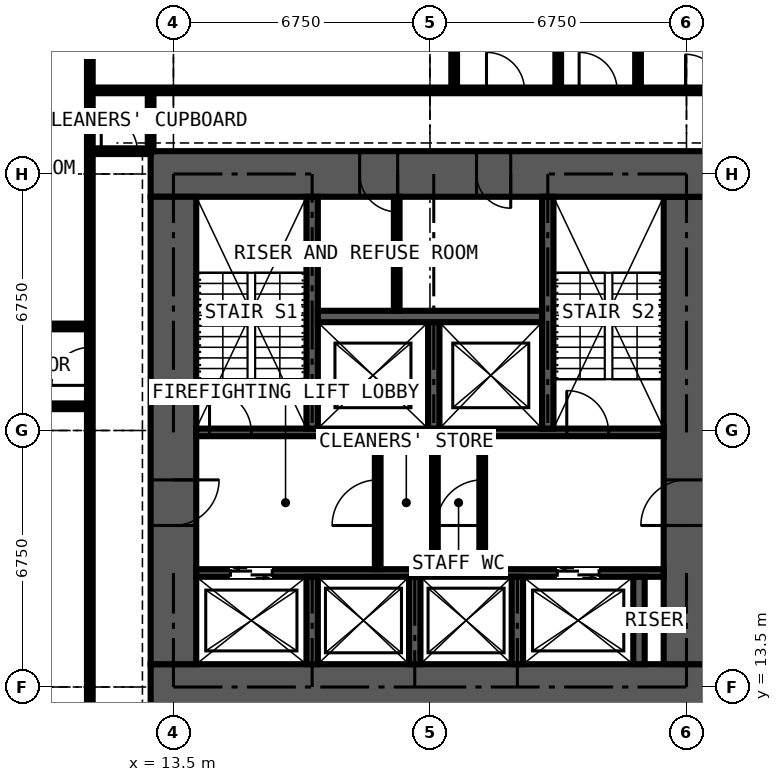
"""IFC4 building model, lengths in metres.
Left out: names, types, materials, properties, quantities, classifications, styles, units other than length and angle.
Written with IfcOpenShell. Run it as: python <this file> out.ifc"""

import sys

from ifc_helpers import new_model, si_unit, direction, frame, frame_2d, origin, place, context, subcontext, project, spatial, rectangle, extrude, element, fill, save


model = new_model("IFC4")
c1 = context("Model", 3, precision=1e-05, world=origin(), true_north=direction((0.0, 1.0)))
c2 = subcontext(c1, "Body", "Model", "MODEL_VIEW")
j1 = project(units=[si_unit("LENGTHUNIT", "METRE"), si_unit("PLANEANGLEUNIT", "RADIAN")], contexts=[c1])
p1 = place(None, origin())
s1 = spatial("IfcSite", under=j1, at=p1, CompositionType="ELEMENT")
p2 = place(p1, origin())
s2 = spatial("IfcBuilding", under=s1, at=p2, CompositionType="ELEMENT")
p3 = place(p2, frame((0.0, 0.0, 25.2)))
s3 = spatial("IfcBuildingStorey", under=s2, at=p3, CompositionType="ELEMENT", Elevation=25.2)
p4 = place(p3, frame((12.9, 13.5, 0.0), z_axis=(0.0, 0.0, 1.0), x_axis=(1.0, 0.0, 0.0)))
e1 = element("IfcWall", 1, at=p4, inside=s3, PredefinedType="SHEAR", context=c2, shape_type="SweptSolid", body=[
    extrude(rectangle(XDim=14.7, YDim=1.2, at=frame_2d((7.35, 0.0))), origin(), (0.0, 0.0, 1.0), 3.6),
])
p5 = place(p3, frame((27.0, 14.1, 0.0), z_axis=(0.0, 0.0, 1.0), x_axis=(0.0, 1.0, 0.0)))
e2 = element("IfcWall", 2, at=p5, inside=s3, PredefinedType="SHEAR", context=c2, shape_type="SweptSolid", body=[
    extrude(rectangle(XDim=12.3, YDim=1.2, at=frame_2d((6.15, 0.0))), origin(), (0.0, 0.0, 1.0), 3.6),
])
p6 = place(p5, frame((3.65, 0.0, 0.0)))
e3 = element("IfcOpeningElement", 3, at=p6, cuts=e2, PredefinedType="OPENING", context=c2, shape_type="SweptSolid", body=[
    extrude(rectangle(XDim=1.2, YDim=2.2, at=frame_2d((0.6, 1.1))), frame((0.0, 0.61, 0.0), z_axis=(0.0, -1.0, 0.0), x_axis=(1.0, 0.0, 0.0)), (0.0, 0.0, 1.0), 1.22),
])
p7 = place(p3, frame((27.6, 27.0, 0.0), z_axis=(0.0, 0.0, 1.0), x_axis=(-1.0, 0.0, 0.0)))
e4 = element("IfcWall", 4, at=p7, inside=s3, PredefinedType="SHEAR", context=c2, shape_type="SweptSolid", body=[
    extrude(rectangle(XDim=14.7, YDim=1.2, at=frame_2d((7.35, 0.0))), origin(), (0.0, 0.0, 1.0), 3.6),
])
p8 = place(p7, frame((5.225, 0.0, 0.0)))
e5 = element("IfcOpeningElement", 5, at=p8, cuts=e4, PredefinedType="OPENING", context=c2, shape_type="SweptSolid", body=[
    extrude(rectangle(XDim=0.9, YDim=2.2, at=frame_2d((0.45, 1.1))), frame((0.0, 0.61, 0.0), z_axis=(0.0, -1.0, 0.0), x_axis=(1.0, 0.0, 0.0)), (0.0, 0.0, 1.0), 1.22),
])
p9 = place(p7, frame((8.2, 0.0, 0.0)))
e6 = element("IfcOpeningElement", 6, at=p9, cuts=e4, PredefinedType="OPENING", context=c2, shape_type="SweptSolid", body=[
    extrude(rectangle(XDim=1.0, YDim=2.2, at=frame_2d((0.5, 1.1))), frame((0.0, 0.61, 0.0), z_axis=(0.0, -1.0, 0.0), x_axis=(1.0, 0.0, 0.0)), (0.0, 0.0, 1.0), 1.22),
])
p10 = place(p3, frame((13.5, 26.4, 0.0), z_axis=(0.0, 0.0, 1.0), x_axis=(0.0, -1.0, 0.0)))
e7 = element("IfcWall", 7, at=p10, inside=s3, PredefinedType="SHEAR", context=c2, shape_type="SweptSolid", body=[
    extrude(rectangle(XDim=12.3, YDim=1.2, at=frame_2d((6.15, 0.0))), origin(), (0.0, 0.0, 1.0), 3.6),
])
p11 = place(p10, frame((7.45, 0.0, 0.0)))
e8 = element("IfcOpeningElement", 8, at=p11, cuts=e7, PredefinedType="OPENING", context=c2, shape_type="SweptSolid", body=[
    extrude(rectangle(XDim=1.2, YDim=2.2, at=frame_2d((0.6, 1.1))), frame((0.0, 0.61, 0.0), z_axis=(0.0, -1.0, 0.0), x_axis=(1.0, 0.0, 0.0)), (0.0, 0.0, 1.0), 1.22),
])
p12 = place(p3, frame((14.1, 16.5, 0.0), z_axis=(0.0, 0.0, 1.0), x_axis=(1.0, 0.0, 0.0)))
e9 = element("IfcWall", 9, at=p12, inside=s3, PredefinedType="SHEAR", context=c2, shape_type="SweptSolid", body=[
    extrude(rectangle(XDim=12.3, YDim=0.2, at=frame_2d((6.15, 0.0))), origin(), (0.0, 0.0, 1.0), 3.6),
])
p13 = place(p12, frame((0.9, 0.0, 0.0)))
e10 = element("IfcOpeningElement", 10, at=p13, cuts=e9, PredefinedType="OPENING", context=c2, shape_type="SweptSolid", body=[
    extrude(rectangle(XDim=1.1, YDim=2.2, at=frame_2d((0.55, 1.1))), frame((0.0, 0.11, 0.0), z_axis=(0.0, -1.0, 0.0), x_axis=(1.0, 0.0, 0.0)), (0.0, 0.0, 1.0), 0.22),
])
p14 = place(p12, frame((9.5, 0.0, 0.0)))
e11 = element("IfcOpeningElement", 11, at=p14, cuts=e9, PredefinedType="OPENING", context=c2, shape_type="SweptSolid", body=[
    extrude(rectangle(XDim=1.1, YDim=2.2, at=frame_2d((0.55, 1.1))), frame((0.0, 0.11, 0.0), z_axis=(0.0, -1.0, 0.0), x_axis=(1.0, 0.0, 0.0)), (0.0, 0.0, 1.0), 0.22),
])
p15 = place(p3, frame((14.1, 20.2, 0.0), z_axis=(0.0, 0.0, 1.0), x_axis=(1.0, 0.0, 0.0)))
e12 = element("IfcWall", 12, at=p15, inside=s3, PredefinedType="SHEAR", context=c2, shape_type="SweptSolid", body=[
    extrude(rectangle(XDim=12.3, YDim=0.2, at=frame_2d((6.15, 0.0))), origin(), (0.0, 0.0, 1.0), 3.6),
])
p16 = place(p15, frame((0.35, 0.0, 0.0)))
e13 = element("IfcOpeningElement", 13, at=p16, cuts=e12, PredefinedType="OPENING", context=c2, shape_type="SweptSolid", body=[
    extrude(rectangle(XDim=1.1, YDim=2.2, at=frame_2d((0.55, 1.1))), frame((0.0, 0.11, 0.0), z_axis=(0.0, -1.0, 0.0), x_axis=(1.0, 0.0, 0.0)), (0.0, 0.0, 1.0), 0.22),
])
p17 = place(p15, frame((9.75, 0.0, 0.0)))
e14 = element("IfcOpeningElement", 14, at=p17, cuts=e12, PredefinedType="OPENING", context=c2, shape_type="SweptSolid", body=[
    extrude(rectangle(XDim=1.1, YDim=2.2, at=frame_2d((0.55, 1.1))), frame((0.0, 0.11, 0.0), z_axis=(0.0, -1.0, 0.0), x_axis=(1.0, 0.0, 0.0)), (0.0, 0.0, 1.0), 0.22),
])
for number, where, z_axis, x_axis in (
    (15, (17.15, 20.3, 0.0), (0.0, 0.0, 1.0), (0.0, 1.0, 0.0)),
    (16, (23.35, 20.3, 0.0), (0.0, 0.0, 1.0), (0.0, 1.0, 0.0)),
):
    element("IfcWall", number, at=place(p3, frame(where, z_axis=z_axis, x_axis=x_axis)), inside=s3, PredefinedType="SHEAR", context=c2, shape_type="SweptSolid", body=[
        extrude(rectangle(XDim=6.1, YDim=0.3, at=frame_2d((3.05, 0.0))), origin(), (0.0, 0.0, 1.0), 3.6),
    ])
p18 = place(p3, frame((20.35, 20.3, 0.0), z_axis=(0.0, 0.0, 1.0), x_axis=(0.0, 1.0, 0.0)))
e17 = element("IfcWall", 17, at=p18, inside=s3, PredefinedType="SHEAR", context=c2, shape_type="SweptSolid", body=[
    extrude(rectangle(XDim=2.8, YDim=0.3, at=frame_2d((1.4, 0.0))), origin(), (0.0, 0.0, 1.0), 3.6),
])
p19 = place(p3, frame((17.3, 23.25, 0.0), z_axis=(0.0, 0.0, 1.0), x_axis=(1.0, 0.0, 0.0)))
e18 = element("IfcWall", 18, at=p19, inside=s3, PredefinedType="SHEAR", context=c2, shape_type="SweptSolid", body=[
    extrude(rectangle(XDim=5.9, YDim=0.3, at=frame_2d((2.95, 0.0))), origin(), (0.0, 0.0, 1.0), 3.6),
])
for number, where, z_axis, x_axis in (
    (19, (17.15, 14.1, 0.0), (0.0, 0.0, 1.0), (0.0, 1.0, 0.0)),
    (20, (19.85, 14.1, 0.0), (0.0, 0.0, 1.0), (0.0, 1.0, 0.0)),
    (21, (22.55, 14.1, 0.0), (0.0, 0.0, 1.0), (0.0, 1.0, 0.0)),
    (22, (25.75, 14.1, 0.0), (0.0, 0.0, 1.0), (0.0, 1.0, 0.0)),
):
    element("IfcWall", number, at=place(p3, frame(where, z_axis=z_axis, x_axis=x_axis)), inside=s3, PredefinedType="SHEAR", context=c2, shape_type="SweptSolid", body=[
        extrude(rectangle(XDim=2.3, YDim=0.3, at=frame_2d((1.15, 0.0))), origin(), (0.0, 0.0, 1.0), 3.6),
    ])
p20 = place(p3, frame((18.875, 16.6, 0.0), z_axis=(0.0, 0.0, 1.0), x_axis=(0.0, 1.0, 0.0)))
e23 = element("IfcWall", 23, at=p20, inside=s3, PredefinedType="PARTITIONING", context=c2, shape_type="SweptSolid", body=[
    extrude(rectangle(XDim=3.5, YDim=0.15, at=frame_2d((1.75, 0.0))), origin(), (0.0, 0.0, 1.0), 3.375),
])
p21 = place(p20, frame((1.15, 0.0, 0.0)))
e24 = element("IfcOpeningElement", 24, at=p21, cuts=e23, PredefinedType="OPENING", context=c2, shape_type="SweptSolid", body=[
    extrude(rectangle(XDim=1.2, YDim=2.2, at=frame_2d((0.6, 1.1))), frame((0.0, 0.085, 0.0), z_axis=(0.0, -1.0, 0.0), x_axis=(1.0, 0.0, 0.0)), (0.0, 0.0, 1.0), 0.17),
])
p22 = place(p3, frame((21.625, 16.6, 0.0), z_axis=(0.0, 0.0, 1.0), x_axis=(0.0, 1.0, 0.0)))
e25 = element("IfcWall", 25, at=p22, inside=s3, PredefinedType="PARTITIONING", context=c2, shape_type="SweptSolid", body=[
    extrude(rectangle(XDim=3.5, YDim=0.15, at=frame_2d((1.75, 0.0))), origin(), (0.0, 0.0, 1.0), 3.375),
])
p23 = place(p22, frame((1.15, 0.0, 0.0)))
e26 = element("IfcOpeningElement", 26, at=p23, cuts=e25, PredefinedType="OPENING", context=c2, shape_type="SweptSolid", body=[
    extrude(rectangle(XDim=1.2, YDim=2.2, at=frame_2d((0.6, 1.1))), frame((0.0, 0.085, 0.0), z_axis=(0.0, -1.0, 0.0), x_axis=(1.0, 0.0, 0.0)), (0.0, 0.0, 1.0), 0.17),
])
p24 = place(p3, frame((20.38, 16.6, 0.0), z_axis=(0.0, 0.0, 1.0), x_axis=(0.0, 1.0, 0.0)))
e27 = element("IfcWall", 27, at=p24, inside=s3, PredefinedType="PARTITIONING", context=c2, shape_type="SweptSolid", body=[
    extrude(rectangle(XDim=3.5, YDim=0.15, at=frame_2d((1.75, 0.0))), origin(), (0.0, 0.0, 1.0), 3.375),
])
p25 = place(p3, frame((19.375, 23.4, 0.0), z_axis=(0.0, 0.0, 1.0), x_axis=(0.0, 1.0, 0.0)))
e28 = element("IfcWall", 28, at=p25, inside=s3, PredefinedType="PARTITIONING", context=c2, shape_type="SweptSolid", body=[
    extrude(rectangle(XDim=3.0, YDim=0.15, at=frame_2d((1.5, 0.0))), origin(), (0.0, 0.0, 1.0), 3.375),
])
for number, where, z_axis, x_axis in (
    (29, (5.65, 20.887, 0.0), (0.0, 0.0, 1.0), (1.0, 0.0, 0.0)),
    (30, (5.65, 22.988, 0.0), (0.0, 0.0, 1.0), (1.0, 0.0, 0.0)),
):
    element("IfcWall", number, at=place(p3, frame(where, z_axis=z_axis, x_axis=x_axis)), inside=s3, PredefinedType="PARTITIONING", context=c2, shape_type="SweptSolid", body=[
        extrude(rectangle(XDim=5.65, YDim=0.15, at=frame_2d((2.825, 0.0))), origin(), (0.0, 0.0, 1.0), 3.375),
    ])
p26 = place(p3, frame((11.3, 11.3, 0.0), z_axis=(0.0, 0.0, 1.0), x_axis=(0.0, 1.0, 0.0)))
e31 = element("IfcWall", 31, at=p26, inside=s3, PredefinedType="PARTITIONING", context=c2, shape_type="SweptSolid", body=[
    extrude(rectangle(XDim=19.075, YDim=0.15, at=frame_2d((9.538, 0.0))), origin(), (0.0, 0.0, 1.0), 3.375),
])
p27 = place(p26, frame((10.137, 0.0, 0.0)))
e32 = element("IfcOpeningElement", 32, at=p27, cuts=e31, PredefinedType="OPENING", context=c2, shape_type="SweptSolid", body=[
    extrude(rectangle(XDim=1.0, YDim=2.2, at=frame_2d((0.5, 1.1))), frame((0.0, 0.085, 0.0), z_axis=(0.0, -1.0, 0.0), x_axis=(1.0, 0.0, 0.0)), (0.0, 0.0, 1.0), 0.17),
])
p28 = place(p3, frame((11.3, 27.6, 0.0), z_axis=(0.0, 0.0, 1.0), x_axis=(1.0, 0.0, 0.0)))
e33 = element("IfcWall", 33, at=p28, inside=s3, PredefinedType="PARTITIONING", context=c2, shape_type="SweptSolid", body=[
    extrude(rectangle(XDim=1.6, YDim=0.15, at=frame_2d((0.8, 0.0))), origin(), (0.0, 0.0, 1.0), 2.877),
])
p29 = place(p28, frame((0.3, 0.0, 0.0)))
e34 = element("IfcOpeningElement", 34, at=p29, cuts=e33, PredefinedType="OPENING", context=c2, shape_type="SweptSolid", body=[
    extrude(rectangle(XDim=0.95, YDim=2.2, at=frame_2d((0.475, 1.1))), frame((0.0, 0.085, 0.0), z_axis=(0.0, -1.0, 0.0), x_axis=(1.0, 0.0, 0.0)), (0.0, 0.0, 1.0), 0.17),
])
p30 = place(p3, frame((11.3, 29.2, 0.0), z_axis=(0.0, 0.0, 1.0), x_axis=(1.0, 0.0, 0.0)))
e35 = element("IfcWall", 35, at=p30, inside=s3, PredefinedType="PARTITIONING", context=c2, shape_type="SweptSolid", body=[
    extrude(rectangle(XDim=19.075, YDim=0.15, at=frame_2d((9.538, 0.0))), origin(), (0.0, 0.0, 1.0), 3.375),
])
p31 = place(p30, frame((12.875, 0.0, 0.0)))
e36 = element("IfcOpeningElement", 36, at=p31, cuts=e35, PredefinedType="OPENING", context=c2, shape_type="SweptSolid", body=[
    extrude(rectangle(XDim=1.0, YDim=2.2, at=frame_2d((0.5, 1.1))), frame((0.0, 0.085, 0.0), z_axis=(0.0, -1.0, 0.0), x_axis=(1.0, 0.0, 0.0)), (0.0, 0.0, 1.0), 0.17),
])
p32 = place(p30, frame((10.438, 0.0, 0.0)))
e37 = element("IfcOpeningElement", 37, at=p32, cuts=e35, PredefinedType="OPENING", context=c2, shape_type="SweptSolid", body=[
    extrude(rectangle(XDim=1.0, YDim=2.2, at=frame_2d((0.5, 1.1))), frame((0.0, 0.085, 0.0), z_axis=(0.0, -1.0, 0.0), x_axis=(1.0, 0.0, 0.0)), (0.0, 0.0, 1.0), 0.17),
])
p33 = place(p30, frame((15.675, 0.0, 0.0)))
e38 = element("IfcOpeningElement", 38, at=p33, cuts=e35, PredefinedType="OPENING", context=c2, shape_type="SweptSolid", body=[
    extrude(rectangle(XDim=0.95, YDim=2.2, at=frame_2d((0.475, 1.1))), frame((0.0, 0.085, 0.0), z_axis=(0.0, -1.0, 0.0), x_axis=(1.0, 0.0, 0.0)), (0.0, 0.0, 1.0), 0.17),
])
p34 = place(p3, frame((12.9, 27.6, 0.0), z_axis=(0.0, 0.0, 1.0), x_axis=(0.0, 1.0, 0.0)))
e39 = element("IfcWall", 39, at=p34, inside=s3, PredefinedType="PARTITIONING", context=c2, shape_type="SweptSolid", body=[
    extrude(rectangle(XDim=1.6, YDim=0.15, at=frame_2d((0.8, 0.0))), origin(), (0.0, 0.0, 1.0), 3.375),
])
p35 = place(p3, frame((20.887, 29.2, 0.0), z_axis=(0.0, 0.0, 1.0), x_axis=(0.0, 1.0, 0.0)))
e40 = element("IfcWall", 40, at=p35, inside=s3, PredefinedType="PARTITIONING", context=c2, shape_type="SweptSolid", body=[
    extrude(rectangle(XDim=5.65, YDim=0.15, at=frame_2d((2.825, 0.0))), origin(), (0.0, 0.0, 1.0), 3.375),
])
p36 = place(p3, frame((23.625, 29.2, 0.0), z_axis=(0.0, 0.0, 1.0), x_axis=(0.0, 1.0, 0.0)))
e41 = element("IfcWall", 41, at=p36, inside=s3, PredefinedType="PARTITIONING", context=c2, shape_type="SweptSolid", body=[
    extrude(rectangle(XDim=12.034, YDim=0.15, at=frame_2d((6.017, 0.0))), origin(), (0.0, 0.0, 1.0), 3.375),
])
p37 = place(p3, frame((25.725, 29.2, 0.0), z_axis=(0.0, 0.0, 1.0), x_axis=(0.0, 1.0, 0.0)))
e42 = element("IfcWall", 42, at=p37, inside=s3, PredefinedType="PARTITIONING", context=c2, shape_type="SweptSolid", body=[
    extrude(rectangle(XDim=5.65, YDim=0.15, at=frame_2d((2.825, 0.0))), origin(), (0.0, 0.0, 1.0), 3.375),
])
p38 = place(p13, origin())
e43 = element("IfcDoor", 43, at=p38, inside=s3, OperationType="DOUBLE_DOOR_SLIDING", PredefinedType="DOOR", context=c2, shape_type="SweptSolid", body=[
    extrude(rectangle(XDim=1.1, YDim=2.2, at=frame_2d((0.55, 1.1))), frame((0.0, 0.025, 0.0), z_axis=(0.0, -1.0, 0.0), x_axis=(1.0, 0.0, 0.0)), (0.0, 0.0, 1.0), 0.05),
])
fill(e10, e43)
p39 = place(p14, origin())
e44 = element("IfcDoor", 44, at=p39, inside=s3, OperationType="DOUBLE_DOOR_SLIDING", PredefinedType="DOOR", context=c2, shape_type="SweptSolid", body=[
    extrude(rectangle(XDim=1.1, YDim=2.2, at=frame_2d((0.55, 1.1))), frame((0.0, 0.025, 0.0), z_axis=(0.0, -1.0, 0.0), x_axis=(1.0, 0.0, 0.0)), (0.0, 0.0, 1.0), 0.05),
])
fill(e11, e44)
p40 = place(p11, origin())
e45 = element("IfcDoor", 45, at=p40, inside=s3, OperationType="DOUBLE_DOOR_SINGLE_SWING", PredefinedType="DOOR", context=c2, shape_type="SweptSolid", body=[
    extrude(rectangle(XDim=1.2, YDim=2.2, at=frame_2d((0.6, 1.1))), frame((0.0, 0.025, 0.0), z_axis=(0.0, -1.0, 0.0), x_axis=(1.0, 0.0, 0.0)), (0.0, 0.0, 1.0), 0.05),
])
fill(e8, e45)
p41 = place(p6, origin())
e46 = element("IfcDoor", 46, at=p41, inside=s3, OperationType="DOUBLE_DOOR_SINGLE_SWING", PredefinedType="DOOR", context=c2, shape_type="SweptSolid", body=[
    extrude(rectangle(XDim=1.2, YDim=2.2, at=frame_2d((0.6, 1.1))), frame((0.0, 0.025, 0.0), z_axis=(0.0, -1.0, 0.0), x_axis=(1.0, 0.0, 0.0)), (0.0, 0.0, 1.0), 0.05),
])
fill(e3, e46)
p42 = place(p21, origin())
e47 = element("IfcDoor", 47, at=p42, inside=s3, OperationType="DOUBLE_DOOR_SINGLE_SWING", PredefinedType="DOOR", context=c2, shape_type="SweptSolid", body=[
    extrude(rectangle(XDim=1.2, YDim=2.2, at=frame_2d((0.6, 1.1))), frame((0.0, 0.025, 0.0), z_axis=(0.0, -1.0, 0.0), x_axis=(1.0, 0.0, 0.0)), (0.0, 0.0, 1.0), 0.05),
])
fill(e24, e47)
p43 = place(p23, origin())
e48 = element("IfcDoor", 48, at=p43, inside=s3, OperationType="DOUBLE_DOOR_SINGLE_SWING", PredefinedType="DOOR", context=c2, shape_type="SweptSolid", body=[
    extrude(rectangle(XDim=1.2, YDim=2.2, at=frame_2d((0.6, 1.1))), frame((0.0, 0.025, 0.0), z_axis=(0.0, -1.0, 0.0), x_axis=(1.0, 0.0, 0.0)), (0.0, 0.0, 1.0), 0.05),
])
fill(e26, e48)
p44 = place(p8, origin())
e49 = element("IfcDoor", 49, at=p44, inside=s3, OperationType="SINGLE_SWING_LEFT", PredefinedType="DOOR", context=c2, shape_type="SweptSolid", body=[
    extrude(rectangle(XDim=0.9, YDim=2.2, at=frame_2d((0.45, 1.1))), frame((0.0, 0.4, 0.0), z_axis=(0.0, -1.0, 0.0), x_axis=(1.0, 0.0, 0.0)), (0.0, 0.0, 1.0), 0.8),
])
fill(e5, e49)
p45 = place(p9, origin())
e50 = element("IfcDoor", 50, at=p45, inside=s3, OperationType="SINGLE_SWING_LEFT", PredefinedType="DOOR", context=c2, shape_type="SweptSolid", body=[
    extrude(rectangle(XDim=1.0, YDim=2.2, at=frame_2d((0.5, 1.1))), frame((0.0, 0.025, 0.0), z_axis=(0.0, -1.0, 0.0), x_axis=(1.0, 0.0, 0.0)), (0.0, 0.0, 1.0), 0.05),
])
fill(e6, e50)
p46 = place(p16, origin())
e51 = element("IfcDoor", 51, at=p46, inside=s3, OperationType="SINGLE_SWING_LEFT", PredefinedType="DOOR", context=c2, shape_type="SweptSolid", body=[
    extrude(rectangle(XDim=1.1, YDim=2.2, at=frame_2d((0.55, 1.1))), frame((0.0, 0.025, 0.0), z_axis=(0.0, -1.0, 0.0), x_axis=(1.0, 0.0, 0.0)), (0.0, 0.0, 1.0), 0.05),
])
fill(e13, e51)
p47 = place(p17, origin())
e52 = element("IfcDoor", 52, at=p47, inside=s3, OperationType="SINGLE_SWING_LEFT", PredefinedType="DOOR", context=c2, shape_type="SweptSolid", body=[
    extrude(rectangle(XDim=1.1, YDim=2.2, at=frame_2d((0.55, 1.1))), frame((0.0, 0.025, 0.0), z_axis=(0.0, -1.0, 0.0), x_axis=(1.0, 0.0, 0.0)), (0.0, 0.0, 1.0), 0.05),
])
fill(e14, e52)
p48 = place(p29, origin())
e53 = element("IfcDoor", 53, at=p48, inside=s3, OperationType="SINGLE_SWING_LEFT", PredefinedType="DOOR", context=c2, shape_type="SweptSolid", body=[
    extrude(rectangle(XDim=0.95, YDim=2.2, at=frame_2d((0.475, 1.1))), frame((0.0, 0.025, 0.0), z_axis=(0.0, -1.0, 0.0), x_axis=(1.0, 0.0, 0.0)), (0.0, 0.0, 1.0), 0.05),
])
fill(e34, e53)
p49 = place(p31, origin())
e54 = element("IfcDoor", 54, at=p49, inside=s3, OperationType="SINGLE_SWING_LEFT", PredefinedType="DOOR", context=c2, shape_type="SweptSolid", body=[
    extrude(rectangle(XDim=1.0, YDim=2.2, at=frame_2d((0.5, 1.1))), frame((0.0, 0.025, 0.0), z_axis=(0.0, -1.0, 0.0), x_axis=(1.0, 0.0, 0.0)), (0.0, 0.0, 1.0), 0.05),
])
fill(e36, e54)
p50 = place(p32, origin())
e55 = element("IfcDoor", 55, at=p50, inside=s3, OperationType="SINGLE_SWING_LEFT", PredefinedType="DOOR", context=c2, shape_type="SweptSolid", body=[
    extrude(rectangle(XDim=1.0, YDim=2.2, at=frame_2d((0.5, 1.1))), frame((0.0, 0.025, 0.0), z_axis=(0.0, -1.0, 0.0), x_axis=(1.0, 0.0, 0.0)), (0.0, 0.0, 1.0), 0.05),
])
fill(e37, e55)
p51 = place(p33, origin())
e56 = element("IfcDoor", 56, at=p51, inside=s3, OperationType="SINGLE_SWING_LEFT", PredefinedType="DOOR", context=c2, shape_type="SweptSolid", body=[
    extrude(rectangle(XDim=0.95, YDim=2.2, at=frame_2d((0.475, 1.1))), frame((0.0, 0.025, 0.0), z_axis=(0.0, -1.0, 0.0), x_axis=(1.0, 0.0, 0.0)), (0.0, 0.0, 1.0), 0.05),
])
fill(e38, e56)
p52 = place(p27, origin())
e57 = element("IfcDoor", 57, at=p52, inside=s3, OperationType="SINGLE_SWING_LEFT", PredefinedType="DOOR", context=c2, shape_type="SweptSolid", body=[
    extrude(rectangle(XDim=1.0, YDim=2.2, at=frame_2d((0.5, 1.1))), frame((0.0, 0.025, 0.0), z_axis=(0.0, -1.0, 0.0), x_axis=(1.0, 0.0, 0.0)), (0.0, 0.0, 1.0), 0.05),
])
fill(e32, e57)
save(model, sys.argv[1])
